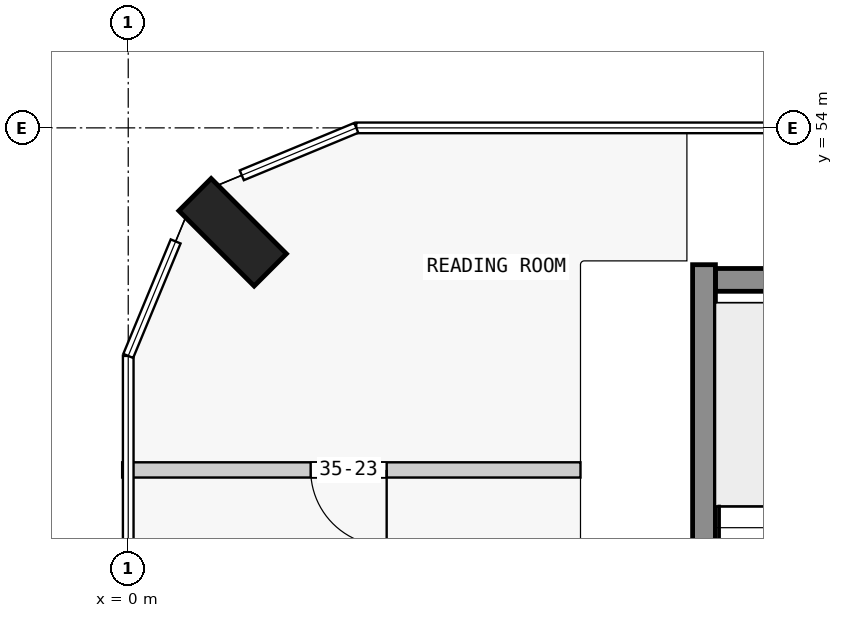
"""IFC4 building model, lengths in metres.
Left out: names, types, materials, properties, quantities, classifications, styles, units other than length and angle.
Written with IfcOpenShell. Run it as: python <this file> out.ifc"""

import sys

from ifc_helpers import new_model, si_unit, direction, frame, frame_2d, origin, origin_2d, place, context, subcontext, project, spatial, rectangle, extrude, element, fill, save


model = new_model("IFC4")
c1 = context("Model", 3, precision=1e-05, world=origin(), true_north=direction((0.0, 1.0)))
c2 = subcontext(c1, "Body", "Model", "MODEL_VIEW")
j1 = project(units=[si_unit("LENGTHUNIT", "METRE"), si_unit("PLANEANGLEUNIT", "RADIAN")], contexts=[c1])
p1 = place(None, origin())
s1 = spatial("IfcSite", under=j1, at=p1, CompositionType="ELEMENT")
p2 = place(p1, origin())
s2 = spatial("IfcBuilding", under=s1, at=p2, CompositionType="ELEMENT")
p3 = place(p2, frame((0.0, 0.0, 139.4)))
s3 = spatial("IfcBuildingStorey", under=s2, at=p3, CompositionType="ELEMENT", Elevation=139.4)
p4 = place(p3, frame((1.374, 52.626, 0.0), z_axis=(0.0, 0.0, 1.0), x_axis=(0.707106781187, 0.707106781187, 0.0)))
e1 = element("IfcColumn", 1, at=p4, inside=s3, PredefinedType="COLUMN", context=c2, shape_type="SweptSolid", body=[
    extrude(rectangle(XDim=0.6, YDim=1.4, at=origin_2d()), origin(), (0.0, 0.0, 1.0), 3.5),
])
p5 = place(p3, frame((7.725, 52.0, 0.0), z_axis=(0.0, 0.0, 1.0), x_axis=(1.0, 0.0, 0.0)))
e2 = element("IfcWall", 2, at=p5, inside=s3, PredefinedType="SHEAR", context=c2, shape_type="SweptSolid", body=[
    extrude(rectangle(XDim=2.55, YDim=0.3, at=frame_2d((1.275, 0.0))), origin(), (0.0, 0.0, 1.0), 3.5),
])
p6 = place(p3, frame((7.575, 45.0, 0.0), z_axis=(0.0, 0.0, 1.0), x_axis=(0.0, 1.0, 0.0)))
e3 = element("IfcWall", 3, at=p6, inside=s3, PredefinedType="SHEAR", context=c2, shape_type="SweptSolid", body=[
    extrude(rectangle(XDim=7.2, YDim=0.3, at=frame_2d((3.6, 0.0))), origin(), (0.0, 0.0, 1.0), 3.5),
])
p7 = place(p3, frame((5.95, 49.5, 0.0), z_axis=(0.0, 0.0, 1.0), x_axis=(-1.0, 0.0, 0.0)))
e4 = element("IfcWall", 4, at=p7, inside=s3, PredefinedType="PARTITIONING", context=c2, shape_type="SweptSolid", body=[
    extrude(rectangle(XDim=6.03, YDim=0.2, at=frame_2d((3.015, 0.0))), origin(), (0.0, 0.0, 1.0), 3.25),
])
p8 = place(p7, frame((2.55, 0.0, 0.0)))
e5 = element("IfcOpeningElement", 5, at=p8, cuts=e4, PredefinedType="OPENING", context=c2, shape_type="SweptSolid", body=[
    extrude(rectangle(XDim=1.0, YDim=2.1, at=frame_2d((0.5, 1.05))), frame((0.0, 0.11, 0.0), z_axis=(0.0, -1.0, 0.0), x_axis=(1.0, 0.0, 0.0)), (0.0, 0.0, 1.0), 0.22),
])
p9 = place(p8, origin())
e6 = element("IfcDoor", 6, at=p9, inside=s3, OperationType="SINGLE_SWING_RIGHT", PredefinedType="DOOR", context=c2, shape_type="SweptSolid", body=[
    extrude(rectangle(XDim=1.0, YDim=2.1, at=frame_2d((0.5, 1.05))), frame((0.0, 0.025, 0.0), z_axis=(0.0, -1.0, 0.0), x_axis=(1.0, 0.0, 0.0)), (0.0, 0.0, 1.0), 0.05),
])
fill(e5, e6)
save(model, sys.argv[1])
